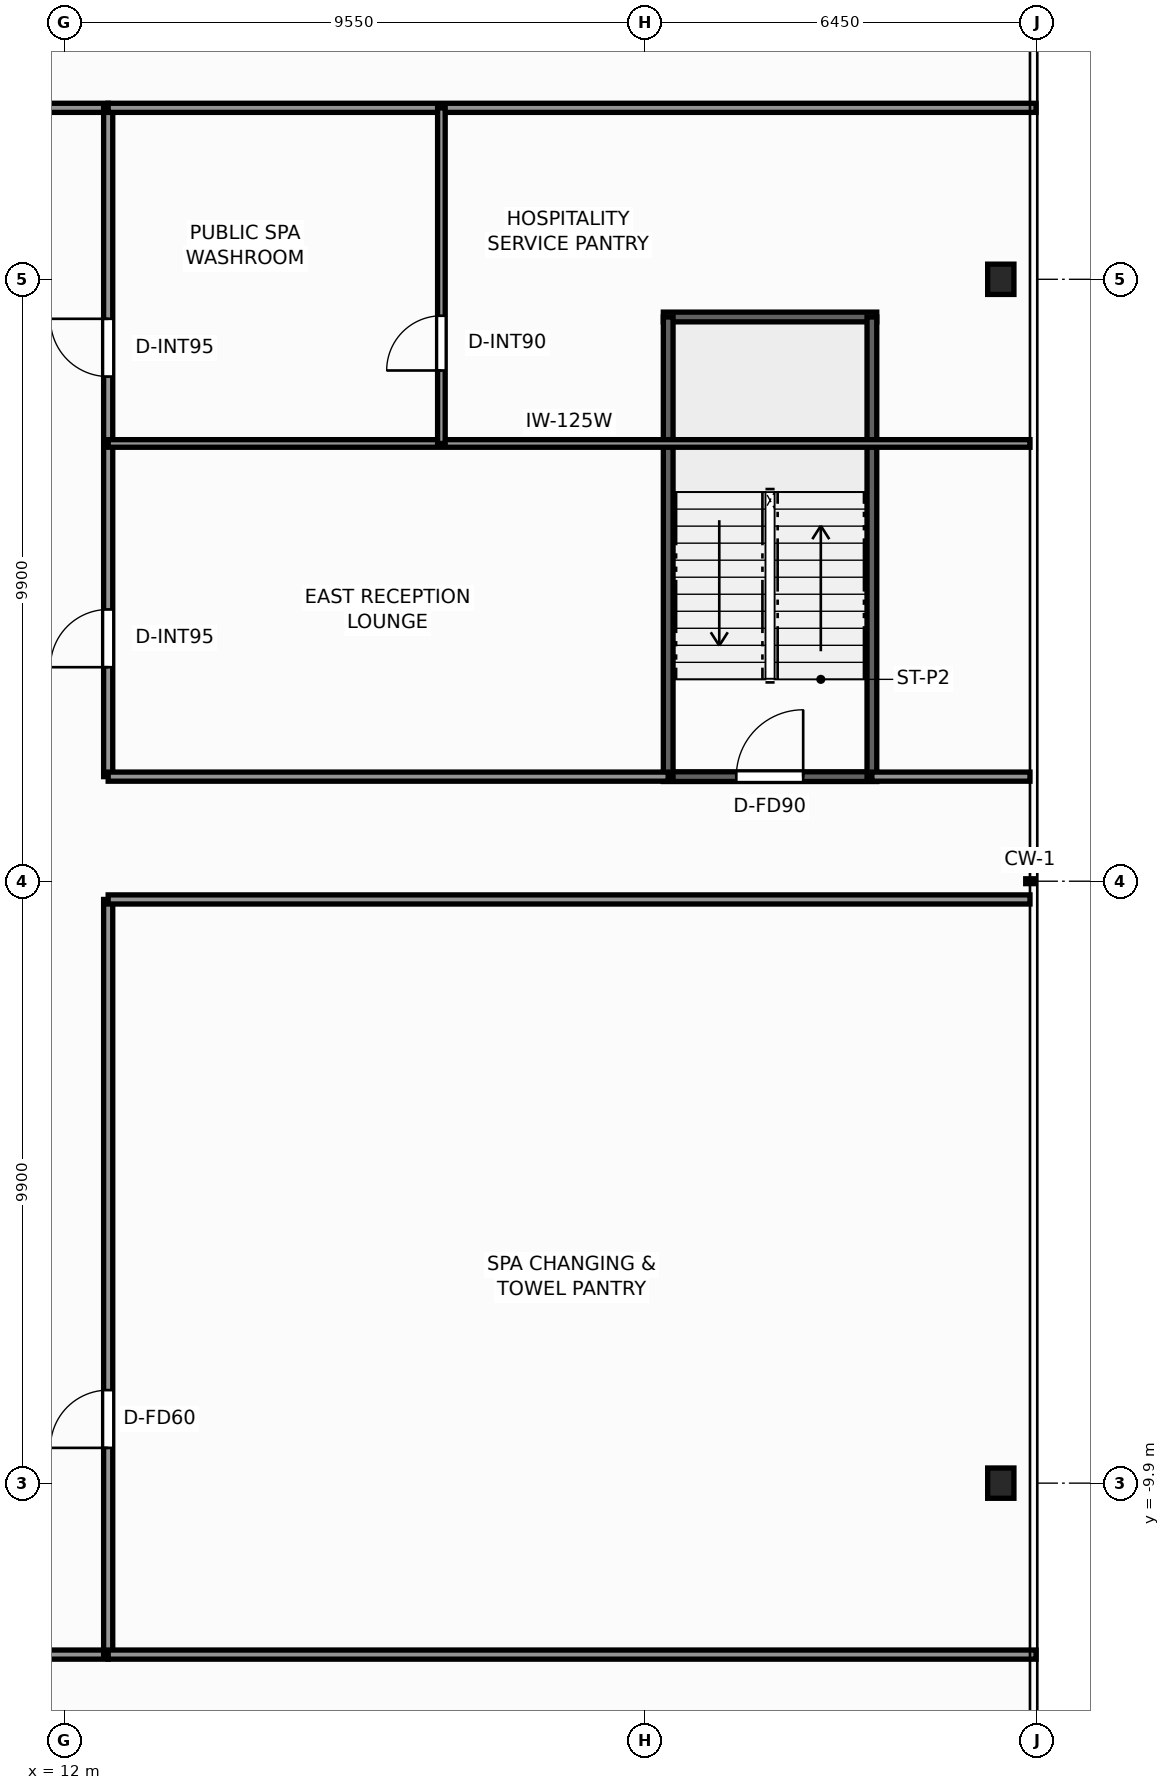
"""IFC4 building model, lengths in metres.
Left out: names, types, materials, properties, quantities, classifications, styles, units other than length and angle.
Written with IfcOpenShell. Run it as: python <this file> out.ifc"""

import sys

from ifc_helpers import new_model, si_unit, direction, frame, frame_2d, origin, origin_2d, place, context, subcontext, project, spatial, rectangle, i_section, extrude, element, fill, save


model = new_model("IFC4")
c1 = context("Model", 3, precision=1e-05, world=origin(), true_north=direction((0.0, 1.0)))
c2 = subcontext(c1, "Body", "Model", "MODEL_VIEW")
j1 = project(units=[si_unit("LENGTHUNIT", "METRE"), si_unit("PLANEANGLEUNIT", "RADIAN")], contexts=[c1])
p1 = place(None, origin())
s1 = spatial("IfcSite", under=j1, at=p1, CompositionType="ELEMENT")
p2 = place(p1, origin())
s2 = spatial("IfcBuilding", under=s1, at=p2, CompositionType="ELEMENT")
p3 = place(p2, frame((0.0, 0.0, 15.2)))
s3 = spatial("IfcBuildingStorey", under=s2, at=p3, CompositionType="ELEMENT", Elevation=15.2)
for number, where, z_axis, x_axis in (
    (1, (27.4, -9.9, 0.0), (0.0, 0.0, 1.0), (1.0, 0.0, 0.0)),
    (2, (27.4, 9.9, 0.0), (0.0, 0.0, 1.0), (1.0, 0.0, 0.0)),
):
    element("IfcColumn", number, at=place(p3, frame(where, z_axis=z_axis, x_axis=x_axis)), inside=s3, PredefinedType="COLUMN", context=c2, shape_type="SweptSolid", body=[
        extrude(i_section(OverallWidth=0.432, OverallDepth=0.498, WebThickness=0.056, FlangeThickness=0.089, FilletRadius=0.025, at=origin_2d()), origin(), (0.0, 0.0, 1.0), 4.1),
    ])
p4 = place(p3, frame((21.85, 1.72, 0.0), z_axis=(0.0, 0.0, 1.0), x_axis=(1.0, 0.0, 0.0)))
e3 = element("IfcWall", 3, at=p4, inside=s3, PredefinedType="SHEAR", context=c2, shape_type="SweptSolid", body=[
    extrude(rectangle(XDim=3.51, YDim=0.16, at=frame_2d((1.755, 0.0))), origin(), (0.0, 0.0, 1.0), 4.1),
])
p5 = place(p4, frame((1.2, 0.0, 0.0)))
e4 = element("IfcOpeningElement", 4, at=p5, cuts=e3, PredefinedType="OPENING", context=c2, shape_type="SweptSolid", body=[
    extrude(rectangle(XDim=1.1, YDim=2.2, at=frame_2d((0.55, 1.1))), frame((0.0, 0.09, 0.0), z_axis=(0.0, -1.0, 0.0), x_axis=(1.0, 0.0, 0.0)), (0.0, 0.0, 1.0), 0.18),
])
p6 = place(p3, frame((21.85, 9.28, 0.0), z_axis=(0.0, 0.0, 1.0), x_axis=(1.0, 0.0, 0.0)))
e5 = element("IfcWall", 5, at=p6, inside=s3, PredefinedType="SHEAR", context=c2, shape_type="SweptSolid", body=[
    extrude(rectangle(XDim=3.51, YDim=0.16, at=frame_2d((1.755, 0.0))), origin(), (0.0, 0.0, 1.0), 4.1),
])
for number, where, z_axis, x_axis in (
    (6, (21.93, 1.72, 0.0), (0.0, 0.0, 1.0), (0.0, 1.0, 0.0)),
    (7, (25.28, 1.72, 0.0), (0.0, 0.0, 1.0), (0.0, 1.0, 0.0)),
):
    element("IfcWall", number, at=place(p3, frame(where, z_axis=z_axis, x_axis=x_axis)), inside=s3, PredefinedType="SHEAR", context=c2, shape_type="SweptSolid", body=[
        extrude(rectangle(XDim=7.56, YDim=0.16, at=frame_2d((3.78, 0.0))), origin(), (0.0, 0.0, 1.0), 4.1),
    ])
p7 = place(p3, frame((-12.72, -12.72, 0.0), z_axis=(0.0, 0.0, 1.0), x_axis=(1.0, 0.0, 0.0)))
e8 = element("IfcWall", 8, at=p7, inside=s3, PredefinedType="PARTITIONING", context=c2, shape_type="SweptSolid", body=[
    extrude(rectangle(XDim=25.44, YDim=0.15, at=frame_2d((12.72, 0.0))), origin(), (0.0, 0.0, 1.0), 2.674),
])
p8 = place(p7, frame((3.6, 0.0, 0.0)))
e9 = element("IfcOpeningElement", 9, at=p8, cuts=e8, PredefinedType="OPENING", context=c2, shape_type="SweptSolid", body=[
    extrude(rectangle(XDim=1.6, YDim=2.3, at=frame_2d((0.8, 1.15))), frame((0.0, 0.085, 0.0), z_axis=(0.0, -1.0, 0.0), x_axis=(1.0, 0.0, 0.0)), (0.0, 0.0, 1.0), 0.17),
])
p9 = place(p7, frame((20.27, 0.0, 0.0)))
e10 = element("IfcOpeningElement", 10, at=p9, cuts=e8, PredefinedType="OPENING", context=c2, shape_type="SweptSolid", body=[
    extrude(rectangle(XDim=1.2, YDim=2.2, at=frame_2d((0.6, 1.1))), frame((0.0, 0.085, 0.0), z_axis=(0.0, -1.0, 0.0), x_axis=(1.0, 0.0, 0.0)), (0.0, 0.0, 1.0), 0.17),
])
p10 = place(p3, frame((-12.72, 12.72, 0.0), z_axis=(0.0, 0.0, 1.0), x_axis=(1.0, 0.0, 0.0)))
e11 = element("IfcWall", 11, at=p10, inside=s3, PredefinedType="PARTITIONING", context=c2, shape_type="SweptSolid", body=[
    extrude(rectangle(XDim=25.44, YDim=0.15, at=frame_2d((12.72, 0.0))), origin(), (0.0, 0.0, 1.0), 2.674),
])
p11 = place(p10, frame((1.8, 0.0, 0.0)))
e12 = element("IfcOpeningElement", 12, at=p11, cuts=e11, PredefinedType="OPENING", context=c2, shape_type="SweptSolid", body=[
    extrude(rectangle(XDim=0.95, YDim=2.06, at=frame_2d((0.475, 1.03))), frame((0.0, 0.085, 0.0), z_axis=(0.0, -1.0, 0.0), x_axis=(1.0, 0.0, 0.0)), (0.0, 0.0, 1.0), 0.17),
])
p12 = place(p10, frame((10.5, 0.0, 0.0)))
e13 = element("IfcOpeningElement", 13, at=p12, cuts=e11, PredefinedType="OPENING", context=c2, shape_type="SweptSolid", body=[
    extrude(rectangle(XDim=1.6, YDim=2.3, at=frame_2d((0.8, 1.15))), frame((0.0, 0.085, 0.0), z_axis=(0.0, -1.0, 0.0), x_axis=(1.0, 0.0, 0.0)), (0.0, 0.0, 1.0), 0.17),
])
p13 = place(p3, frame((12.72, -12.72, 0.0), z_axis=(0.0, 0.0, 1.0), x_axis=(0.0, 1.0, 0.0)))
e14 = element("IfcWall", 14, at=p13, inside=s3, PredefinedType="PARTITIONING", context=c2, shape_type="SweptSolid", body=[
    extrude(rectangle(XDim=12.42, YDim=0.15, at=frame_2d((6.21, 0.0))), origin(), (0.0, 0.0, 1.0), 2.674),
])
p14 = place(p13, frame((3.4, 0.0, 0.0)))
e15 = element("IfcOpeningElement", 15, at=p14, cuts=e14, PredefinedType="OPENING", context=c2, shape_type="SweptSolid", body=[
    extrude(rectangle(XDim=0.95, YDim=2.06, at=frame_2d((0.475, 1.03))), frame((0.0, 0.085, 0.0), z_axis=(0.0, -1.0, 0.0), x_axis=(1.0, 0.0, 0.0)), (0.0, 0.0, 1.0), 0.17),
])
p15 = place(p3, frame((12.72, 1.72, 0.0), z_axis=(0.0, 0.0, 1.0), x_axis=(0.0, 1.0, 0.0)))
e16 = element("IfcWall", 16, at=p15, inside=s3, PredefinedType="PARTITIONING", context=c2, shape_type="SweptSolid", body=[
    extrude(rectangle(XDim=11.0, YDim=0.15, at=frame_2d((5.5, 0.0))), origin(), (0.0, 0.0, 1.0), 2.674),
])
p16 = place(p15, frame((6.58, 0.0, 0.0)))
e17 = element("IfcOpeningElement", 17, at=p16, cuts=e16, PredefinedType="OPENING", context=c2, shape_type="SweptSolid", body=[
    extrude(rectangle(XDim=0.95, YDim=2.06, at=frame_2d((0.475, 1.03))), frame((0.0, 0.085, 0.0), z_axis=(0.0, -1.0, 0.0), x_axis=(1.0, 0.0, 0.0)), (0.0, 0.0, 1.0), 0.17),
])
p17 = place(p15, frame((1.8, 0.0, 0.0)))
e18 = element("IfcOpeningElement", 18, at=p17, cuts=e16, PredefinedType="OPENING", context=c2, shape_type="SweptSolid", body=[
    extrude(rectangle(XDim=0.95, YDim=2.06, at=frame_2d((0.475, 1.03))), frame((0.0, 0.085, 0.0), z_axis=(0.0, -1.0, 0.0), x_axis=(1.0, 0.0, 0.0)), (0.0, 0.0, 1.0), 0.17),
])
p18 = place(p3, frame((12.72, -0.3, 0.0), z_axis=(0.0, 0.0, 1.0), x_axis=(1.0, 0.0, 0.0)))
e19 = element("IfcWall", 19, at=p18, inside=s3, PredefinedType="PARTITIONING", context=c2, shape_type="SweptSolid", body=[
    extrude(rectangle(XDim=15.16, YDim=0.15, at=frame_2d((7.58, 0.0))), origin(), (0.0, 0.0, 1.0), 3.069),
])
p19 = place(p3, frame((12.72, 1.72, 0.0), z_axis=(0.0, 0.0, 1.0), x_axis=(1.0, 0.0, 0.0)))
e20 = element("IfcWall", 20, at=p19, inside=s3, PredefinedType="PARTITIONING", context=c2, shape_type="SweptSolid", body=[
    extrude(rectangle(XDim=9.21, YDim=0.15, at=frame_2d((4.605, 0.0))), origin(), (0.0, 0.0, 1.0), 3.7),
])
p20 = place(p3, frame((25.28, 1.72, 0.0), z_axis=(0.0, 0.0, 1.0), x_axis=(1.0, 0.0, 0.0)))
e21 = element("IfcWall", 21, at=p20, inside=s3, PredefinedType="PARTITIONING", context=c2, shape_type="SweptSolid", body=[
    extrude(rectangle(XDim=2.6, YDim=0.15, at=frame_2d((1.3, 0.0))), origin(), (0.0, 0.0, 1.0), 3.069),
])
for number, where, z_axis, x_axis in (
    (22, (12.72, -12.72, 0.0), (0.0, 0.0, 1.0), (1.0, 0.0, 0.0)),
    (23, (12.72, 12.72, 0.0), (0.0, 0.0, 1.0), (1.0, 0.0, 0.0)),
):
    element("IfcWall", number, at=place(p3, frame(where, z_axis=z_axis, x_axis=x_axis)), inside=s3, PredefinedType="PARTITIONING", context=c2, shape_type="SweptSolid", body=[
        extrude(rectangle(XDim=15.26, YDim=0.15, at=frame_2d((7.63, 0.0))), origin(), (0.0, 0.0, 1.0), 3.069),
    ])
p21 = place(p3, frame((12.72, 7.2, 0.0), z_axis=(0.0, 0.0, 1.0), x_axis=(1.0, 0.0, 0.0)))
e24 = element("IfcWall", 24, at=p21, inside=s3, PredefinedType="PARTITIONING", context=c2, shape_type="SweptSolid", body=[
    extrude(rectangle(XDim=15.16, YDim=0.125, at=frame_2d((7.58, 0.0))), origin(), (0.0, 0.0, 1.0), 3.069),
])
p22 = place(p3, frame((18.2, 7.2, 0.0), z_axis=(0.0, 0.0, 1.0), x_axis=(0.0, 1.0, 0.0)))
e25 = element("IfcWall", 25, at=p22, inside=s3, PredefinedType="PARTITIONING", context=c2, shape_type="SweptSolid", body=[
    extrude(rectangle(XDim=5.52, YDim=0.125, at=frame_2d((2.76, 0.0))), origin(), (0.0, 0.0, 1.0), 2.674),
])
p23 = place(p22, frame((1.2, 0.0, 0.0)))
e26 = element("IfcOpeningElement", 26, at=p23, cuts=e25, PredefinedType="OPENING", context=c2, shape_type="SweptSolid", body=[
    extrude(rectangle(XDim=0.9, YDim=2.06, at=frame_2d((0.45, 1.03))), frame((0.0, 0.073, 0.0), z_axis=(0.0, -1.0, 0.0), x_axis=(1.0, 0.0, 0.0)), (0.0, 0.0, 1.0), 0.145),
])
p24 = place(p5, origin())
e27 = element("IfcDoor", 27, at=p24, inside=s3, OperationType="SINGLE_SWING_RIGHT", PredefinedType="DOOR", context=c2, shape_type="SweptSolid", body=[
    extrude(rectangle(XDim=1.1, YDim=2.2, at=frame_2d((0.55, 1.1))), frame((0.0, 0.025, 0.0), z_axis=(0.0, -1.0, 0.0), x_axis=(1.0, 0.0, 0.0)), (0.0, 0.0, 1.0), 0.05),
])
fill(e4, e27)
p25 = place(p14, origin())
e28 = element("IfcDoor", 28, at=p25, inside=s3, OperationType="SINGLE_SWING_LEFT", PredefinedType="DOOR", context=c2, shape_type="SweptSolid", body=[
    extrude(rectangle(XDim=0.95, YDim=2.06, at=frame_2d((0.475, 1.03))), frame((0.0, 0.025, 0.0), z_axis=(0.0, -1.0, 0.0), x_axis=(1.0, 0.0, 0.0)), (0.0, 0.0, 1.0), 0.05),
])
fill(e15, e28)
p26 = place(p16, origin())
e29 = element("IfcDoor", 29, at=p26, inside=s3, OperationType="SINGLE_SWING_RIGHT", PredefinedType="DOOR", context=c2, shape_type="SweptSolid", body=[
    extrude(rectangle(XDim=0.95, YDim=2.06, at=frame_2d((0.475, 1.03))), frame((0.0, 0.025, 0.0), z_axis=(0.0, -1.0, 0.0), x_axis=(1.0, 0.0, 0.0)), (0.0, 0.0, 1.0), 0.05),
])
fill(e17, e29)
p27 = place(p23, origin())
e30 = element("IfcDoor", 30, at=p27, inside=s3, OperationType="SINGLE_SWING_LEFT", PredefinedType="DOOR", context=c2, shape_type="SweptSolid", body=[
    extrude(rectangle(XDim=0.9, YDim=2.06, at=frame_2d((0.45, 1.03))), frame((0.0, 0.025, 0.0), z_axis=(0.0, -1.0, 0.0), x_axis=(1.0, 0.0, 0.0)), (0.0, 0.0, 1.0), 0.05),
])
fill(e26, e30)
p28 = place(p17, origin())
e31 = element("IfcDoor", 31, at=p28, inside=s3, OperationType="SINGLE_SWING_LEFT", PredefinedType="DOOR", context=c2, shape_type="SweptSolid", body=[
    extrude(rectangle(XDim=0.95, YDim=2.06, at=frame_2d((0.475, 1.03))), frame((0.0, 0.025, 0.0), z_axis=(0.0, -1.0, 0.0), x_axis=(1.0, 0.0, 0.0)), (0.0, 0.0, 1.0), 0.05),
])
fill(e18, e31)
save(model, sys.argv[1])
